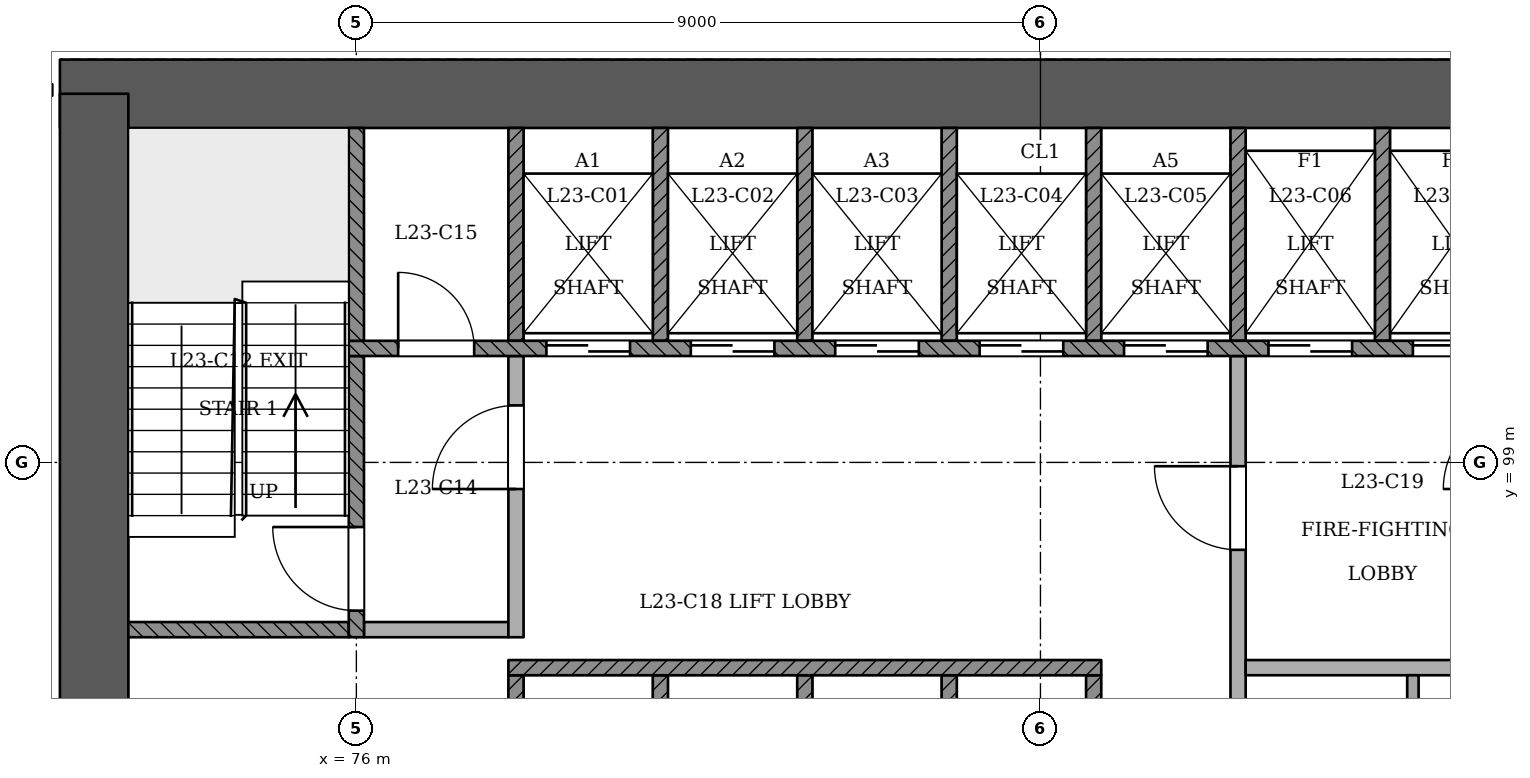
"""IFC4 building model, lengths in metres.
Left out: names, types, materials, properties, quantities, classifications, styles, units other than length and angle.
Written with IfcOpenShell. Run it as: python <this file> out.ifc"""

import sys

from ifc_helpers import new_model, si_unit, direction, frame, frame_2d, origin, place, context, subcontext, project, spatial, rectangle, extrude, element, fill, save


model = new_model("IFC4")
c1 = context("Model", 3, precision=1e-05, world=origin(), true_north=direction((0.0, 1.0)))
c2 = subcontext(c1, "Body", "Model", "MODEL_VIEW")
j1 = project(units=[si_unit("LENGTHUNIT", "METRE"), si_unit("PLANEANGLEUNIT", "RADIAN")], contexts=[c1])
p1 = place(None, origin())
s1 = spatial("IfcSite", under=j1, at=p1, CompositionType="ELEMENT")
p2 = place(p1, origin())
s2 = spatial("IfcBuilding", under=s1, at=p2, CompositionType="ELEMENT")
p3 = place(p2, frame((0.0, 0.0, 91.8)))
s3 = spatial("IfcBuildingStorey", under=s2, at=p3, CompositionType="ELEMENT", Elevation=91.8)
p4 = place(p3, frame((97.45, 103.85, 0.0), z_axis=(0.0, 0.0, 1.0), x_axis=(-1.0, 0.0, 0.0)))
e1 = element("IfcWall", 1, at=p4, inside=s3, PredefinedType="SHEAR", context=c2, shape_type="SweptSolid", body=[
    extrude(rectangle(XDim=25.35, YDim=0.9, at=frame_2d((12.675, 0.0))), origin(), (0.0, 0.0, 1.0), 3.6),
])
p5 = place(p3, frame((72.55, 103.85, 0.0), z_axis=(0.0, 0.0, 1.0), x_axis=(0.0, -1.0, 0.0)))
e2 = element("IfcWall", 2, at=p5, inside=s3, PredefinedType="SHEAR", context=c2, shape_type="SweptSolid", body=[
    extrude(rectangle(XDim=11.35, YDim=0.9, at=frame_2d((5.675, 0.0))), origin(), (0.0, 0.0, 1.0), 3.6),
])
p6 = place(p3, frame((63.319, 97.54, 0.0), z_axis=(0.0, 0.0, 1.0), x_axis=(0.500001382442, -0.86602460563, 0.0)))
e3 = element("IfcWall", 3, at=p6, inside=s3, PredefinedType="PARTITIONING", context=c2, shape_type="SweptSolid", body=[
    extrude(rectangle(XDim=42.252, YDim=0.15, at=frame_2d((21.126, 0.0))), origin(), (0.0, 0.0, 1.0), 2.9),
])
p7 = place(p6, frame((3.076, 0.0, 0.0)))
e4 = element("IfcOpeningElement", 4, at=p7, cuts=e3, PredefinedType="OPENING", context=c2, shape_type="SweptSolid", body=[
    extrude(rectangle(XDim=1.2, YDim=2.1, at=frame_2d((0.6, 1.05))), frame((0.0, 0.085, 0.0), z_axis=(0.0, -1.0, 0.0), x_axis=(1.0, 0.0, 0.0)), (0.0, 0.0, 1.0), 0.171),
])
p8 = place(p6, frame((10.455, 0.0, 0.0)))
e5 = element("IfcOpeningElement", 5, at=p8, cuts=e3, PredefinedType="OPENING", context=c2, shape_type="SweptSolid", body=[
    extrude(rectangle(XDim=1.1, YDim=2.1, at=frame_2d((0.55, 1.05))), frame((0.0, 0.085, 0.0), z_axis=(0.0, -1.0, 0.0), x_axis=(1.0, 0.0, 0.0)), (0.0, 0.0, 1.0), 0.171),
])
p9 = place(p6, frame((13.876, 0.0, 0.0)))
e6 = element("IfcOpeningElement", 6, at=p9, cuts=e3, PredefinedType="OPENING", context=c2, shape_type="SweptSolid", body=[
    extrude(rectangle(XDim=1.0, YDim=2.1, at=frame_2d((0.5, 1.05))), frame((0.0, 0.085, 0.0), z_axis=(0.0, -1.0, 0.0), x_axis=(1.0, 0.0, 0.0)), (0.0, 0.0, 1.0), 0.171),
])
p10 = place(p6, frame((18.376, 0.0, 0.0)))
e7 = element("IfcOpeningElement", 7, at=p10, cuts=e3, PredefinedType="OPENING", context=c2, shape_type="SweptSolid", body=[
    extrude(rectangle(XDim=1.0, YDim=2.1, at=frame_2d((0.5, 1.05))), frame((0.0, 0.085, 0.0), z_axis=(0.0, -1.0, 0.0), x_axis=(1.0, 0.0, 0.0)), (0.0, 0.0, 1.0), 0.171),
])
p11 = place(p6, frame((21.731, 0.0, 0.0)))
e8 = element("IfcOpeningElement", 8, at=p11, cuts=e3, PredefinedType="OPENING", context=c2, shape_type="SweptSolid", body=[
    extrude(rectangle(XDim=1.0, YDim=2.1, at=frame_2d((0.5, 1.05))), frame((0.0, 0.085, 0.0), z_axis=(0.0, -1.0, 0.0), x_axis=(1.0, 0.0, 0.0)), (0.0, 0.0, 1.0), 0.171),
])
p12 = place(p6, frame((28.406, 0.0, 0.0)))
e9 = element("IfcOpeningElement", 9, at=p12, cuts=e3, PredefinedType="OPENING", context=c2, shape_type="SweptSolid", body=[
    extrude(rectangle(XDim=1.0, YDim=2.1, at=frame_2d((0.5, 1.05))), frame((0.0, 0.085, 0.0), z_axis=(0.0, -1.0, 0.0), x_axis=(1.0, 0.0, 0.0)), (0.0, 0.0, 1.0), 0.171),
])
p13 = place(p6, frame((30.847, 0.0, 0.0)))
e10 = element("IfcOpeningElement", 10, at=p13, cuts=e3, PredefinedType="OPENING", context=c2, shape_type="SweptSolid", body=[
    extrude(rectangle(XDim=1.0, YDim=2.1, at=frame_2d((0.5, 1.05))), frame((0.0, 0.085, 0.0), z_axis=(0.0, -1.0, 0.0), x_axis=(1.0, 0.0, 0.0)), (0.0, 0.0, 1.0), 0.171),
])
p14 = place(p6, frame((37.989, 0.0, 0.0)))
e11 = element("IfcOpeningElement", 11, at=p14, cuts=e3, PredefinedType="OPENING", context=c2, shape_type="SweptSolid", body=[
    extrude(rectangle(XDim=1.2, YDim=2.1, at=frame_2d((0.6, 1.05))), frame((0.0, 0.085, 0.0), z_axis=(0.0, -1.0, 0.0), x_axis=(1.0, 0.0, 0.0)), (0.0, 0.0, 1.0), 0.171),
])
p15 = place(p3, frame((85.554, 60.948, 0.0), z_axis=(0.0, 0.0, 1.0), x_axis=(0.500001382442, 0.86602460563, 0.0)))
e12 = element("IfcWall", 12, at=p15, inside=s3, PredefinedType="PARTITIONING", context=c2, shape_type="SweptSolid", body=[
    extrude(rectangle(XDim=42.252, YDim=0.15, at=frame_2d((21.126, 0.0))), origin(), (0.0, 0.0, 1.0), 2.9),
])
p16 = place(p15, frame((0.285, 0.0, 0.0)))
e13 = element("IfcOpeningElement", 13, at=p16, cuts=e12, PredefinedType="OPENING", context=c2, shape_type="SweptSolid", body=[
    extrude(rectangle(XDim=1.2, YDim=2.1, at=frame_2d((0.6, 1.05))), frame((0.0, 0.085, 0.0), z_axis=(0.0, -1.0, 0.0), x_axis=(1.0, 0.0, 0.0)), (0.0, 0.0, 1.0), 0.171),
])
p17 = place(p15, frame((3.731, 0.0, 0.0)))
e14 = element("IfcOpeningElement", 14, at=p17, cuts=e12, PredefinedType="OPENING", context=c2, shape_type="SweptSolid", body=[
    extrude(rectangle(XDim=1.0, YDim=2.1, at=frame_2d((0.5, 1.05))), frame((0.0, 0.085, 0.0), z_axis=(0.0, -1.0, 0.0), x_axis=(1.0, 0.0, 0.0)), (0.0, 0.0, 1.0), 0.171),
])
p18 = place(p15, frame((11.526, 0.0, 0.0)))
e15 = element("IfcOpeningElement", 15, at=p18, cuts=e12, PredefinedType="OPENING", context=c2, shape_type="SweptSolid", body=[
    extrude(rectangle(XDim=1.2, YDim=2.1, at=frame_2d((0.6, 1.05))), frame((0.0, 0.085, 0.0), z_axis=(0.0, -1.0, 0.0), x_axis=(1.0, 0.0, 0.0)), (0.0, 0.0, 1.0), 0.171),
])
p19 = place(p15, frame((18.376, 0.0, 0.0)))
e16 = element("IfcOpeningElement", 16, at=p19, cuts=e12, PredefinedType="OPENING", context=c2, shape_type="SweptSolid", body=[
    extrude(rectangle(XDim=1.0, YDim=2.1, at=frame_2d((0.5, 1.05))), frame((0.0, 0.085, 0.0), z_axis=(0.0, -1.0, 0.0), x_axis=(1.0, 0.0, 0.0)), (0.0, 0.0, 1.0), 0.171),
])
p20 = place(p15, frame((21.731, 0.0, 0.0)))
e17 = element("IfcOpeningElement", 17, at=p20, cuts=e12, PredefinedType="OPENING", context=c2, shape_type="SweptSolid", body=[
    extrude(rectangle(XDim=1.0, YDim=2.1, at=frame_2d((0.5, 1.05))), frame((0.0, 0.085, 0.0), z_axis=(0.0, -1.0, 0.0), x_axis=(1.0, 0.0, 0.0)), (0.0, 0.0, 1.0), 0.171),
])
p21 = place(p15, frame((27.376, 0.0, 0.0)))
e18 = element("IfcOpeningElement", 18, at=p21, cuts=e12, PredefinedType="OPENING", context=c2, shape_type="SweptSolid", body=[
    extrude(rectangle(XDim=1.0, YDim=2.1, at=frame_2d((0.5, 1.05))), frame((0.0, 0.085, 0.0), z_axis=(0.0, -1.0, 0.0), x_axis=(1.0, 0.0, 0.0)), (0.0, 0.0, 1.0), 0.171),
])
p22 = place(p15, frame((30.697, 0.0, 0.0)))
e19 = element("IfcOpeningElement", 19, at=p22, cuts=e12, PredefinedType="OPENING", context=c2, shape_type="SweptSolid", body=[
    extrude(rectangle(XDim=1.1, YDim=2.1, at=frame_2d((0.55, 1.05))), frame((0.0, 0.085, 0.0), z_axis=(0.0, -1.0, 0.0), x_axis=(1.0, 0.0, 0.0)), (0.0, 0.0, 1.0), 0.171),
])
p23 = place(p15, frame((37.976, 0.0, 0.0)))
e20 = element("IfcOpeningElement", 20, at=p23, cuts=e12, PredefinedType="OPENING", context=c2, shape_type="SweptSolid", body=[
    extrude(rectangle(XDim=1.2, YDim=2.1, at=frame_2d((0.6, 1.05))), frame((0.0, 0.085, 0.0), z_axis=(0.0, -1.0, 0.0), x_axis=(1.0, 0.0, 0.0)), (0.0, 0.0, 1.0), 0.171),
])
p24 = place(p3, frame((72.0, 103.9, 0.0), z_axis=(0.0, 0.0, 1.0), x_axis=(-1.0, 0.0, 0.0)))
e21 = element("IfcWall", 21, at=p24, inside=s3, PredefinedType="PARTITIONING", context=c2, shape_type="SweptSolid", body=[
    extrude(rectangle(XDim=1.925, YDim=0.15, at=frame_2d((0.962, 0.0))), origin(), (0.0, 0.0, 1.0), 3.3),
])
for number, where, z_axis, x_axis in (
    (22, (78.1, 93.4, 0.0), (0.0, 0.0, 1.0), (0.0, 1.0, 0.0)),
    (23, (80.0, 93.4, 0.0), (0.0, 0.0, 1.0), (0.0, 1.0, 0.0)),
    (24, (81.9, 93.4, 0.0), (0.0, 0.0, 1.0), (0.0, 1.0, 0.0)),
    (25, (83.8, 93.4, 0.0), (0.0, 0.0, 1.0), (0.0, 1.0, 0.0)),
    (26, (85.7, 93.4, 0.0), (0.0, 0.0, 1.0), (0.0, 1.0, 0.0)),
):
    element("IfcWall", number, at=place(p3, frame(where, z_axis=z_axis, x_axis=x_axis)), inside=s3, PredefinedType="SOLIDWALL", context=c2, shape_type="SweptSolid", body=[
        extrude(rectangle(XDim=2.8, YDim=0.2, at=frame_2d((1.4, 0.0))), origin(), (0.0, 0.0, 1.0), 3.3),
    ])
p25 = place(p3, frame((87.6, 93.4, 0.0), z_axis=(0.0, 0.0, 1.0), x_axis=(0.0, 1.0, 0.0)))
e27 = element("IfcWall", 27, at=p25, inside=s3, PredefinedType="PARTITIONING", context=c2, shape_type="SweptSolid", body=[
    extrude(rectangle(XDim=7.0, YDim=0.2, at=frame_2d((3.5, 0.0))), origin(), (0.0, 0.0, 1.0), 3.3),
])
p26 = place(p25, frame((4.45, 0.0, 0.0)))
e28 = element("IfcOpeningElement", 28, at=p26, cuts=e27, PredefinedType="OPENING", context=c2, shape_type="SweptSolid", body=[
    extrude(rectangle(XDim=1.1, YDim=2.1, at=frame_2d((0.55, 1.05))), frame((0.0, 0.11, 0.0), z_axis=(0.0, -1.0, 0.0), x_axis=(1.0, 0.0, 0.0)), (0.0, 0.0, 1.0), 0.221),
])
p27 = place(p3, frame((89.9, 93.4, 0.0), z_axis=(0.0, 0.0, 1.0), x_axis=(0.0, 1.0, 0.0)))
e29 = element("IfcWall", 29, at=p27, inside=s3, PredefinedType="PARTITIONING", context=c2, shape_type="SweptSolid", body=[
    extrude(rectangle(XDim=2.8, YDim=0.15, at=frame_2d((1.4, 0.0))), origin(), (0.0, 0.0, 1.0), 3.3),
])
p28 = place(p3, frame((78.0, 96.3, 0.0), z_axis=(0.0, 0.0, 1.0), x_axis=(1.0, 0.0, 0.0)))
e30 = element("IfcWall", 30, at=p28, inside=s3, PredefinedType="SOLIDWALL", context=c2, shape_type="SweptSolid", body=[
    extrude(rectangle(XDim=7.8, YDim=0.2, at=frame_2d((3.9, 0.0))), origin(), (0.0, 0.0, 1.0), 3.3),
])
p29 = place(p3, frame((87.7, 96.3, 0.0), z_axis=(0.0, 0.0, 1.0), x_axis=(1.0, 0.0, 0.0)))
e31 = element("IfcWall", 31, at=p29, inside=s3, PredefinedType="PARTITIONING", context=c2, shape_type="SweptSolid", body=[
    extrude(rectangle(XDim=3.6, YDim=0.2, at=frame_2d((1.8, 0.0))), origin(), (0.0, 0.0, 1.0), 3.3),
])
p30 = place(p3, frame((73.0, 96.8, 0.0), z_axis=(0.0, 0.0, 1.0), x_axis=(1.0, 0.0, 0.0)))
e32 = element("IfcWall", 32, at=p30, inside=s3, PredefinedType="SOLIDWALL", context=c2, shape_type="SweptSolid", body=[
    extrude(rectangle(XDim=2.9, YDim=0.2, at=frame_2d((1.45, 0.0))), origin(), (0.0, 0.0, 1.0), 3.3),
])
p31 = place(p3, frame((76.0, 96.7, 0.0), z_axis=(0.0, 0.0, 1.0), x_axis=(0.0, 1.0, 0.0)))
e33 = element("IfcWall", 33, at=p31, inside=s3, PredefinedType="SOLIDWALL", context=c2, shape_type="SweptSolid", body=[
    extrude(rectangle(XDim=3.7, YDim=0.2, at=frame_2d((1.85, 0.0))), origin(), (0.0, 0.0, 1.0), 3.3),
])
p32 = place(p31, frame((0.35, 0.0, 0.0)))
e34 = element("IfcOpeningElement", 34, at=p32, cuts=e33, PredefinedType="OPENING", context=c2, shape_type="SweptSolid", body=[
    extrude(rectangle(XDim=1.1, YDim=2.1, at=frame_2d((0.55, 1.05))), frame((0.0, 0.11, 0.0), z_axis=(0.0, -1.0, 0.0), x_axis=(1.0, 0.0, 0.0)), (0.0, 0.0, 1.0), 0.221),
])
p33 = place(p3, frame((76.1, 96.8, 0.0), z_axis=(0.0, 0.0, 1.0), x_axis=(1.0, 0.0, 0.0)))
e35 = element("IfcWall", 35, at=p33, inside=s3, PredefinedType="PARTITIONING", context=c2, shape_type="SweptSolid", body=[
    extrude(rectangle(XDim=1.9, YDim=0.2, at=frame_2d((0.95, 0.0))), origin(), (0.0, 0.0, 1.0), 3.3),
])
p34 = place(p3, frame((78.1, 96.7, 0.0), z_axis=(0.0, 0.0, 1.0), x_axis=(0.0, 1.0, 0.0)))
e36 = element("IfcWall", 36, at=p34, inside=s3, PredefinedType="PARTITIONING", context=c2, shape_type="SweptSolid", body=[
    extrude(rectangle(XDim=3.7, YDim=0.2, at=frame_2d((1.85, 0.0))), origin(), (0.0, 0.0, 1.0), 3.3),
])
p35 = place(p34, frame((1.95, 0.0, 0.0)))
e37 = element("IfcOpeningElement", 37, at=p35, cuts=e36, PredefinedType="OPENING", context=c2, shape_type="SweptSolid", body=[
    extrude(rectangle(XDim=1.1, YDim=2.1, at=frame_2d((0.55, 1.05))), frame((0.0, 0.11, 0.0), z_axis=(0.0, -1.0, 0.0), x_axis=(1.0, 0.0, 0.0)), (0.0, 0.0, 1.0), 0.221),
])
p36 = place(p3, frame((75.9, 100.5, 0.0), z_axis=(0.0, 0.0, 1.0), x_axis=(1.0, 0.0, 0.0)))
e38 = element("IfcWall", 38, at=p36, inside=s3, PredefinedType="SOLIDWALL", context=c2, shape_type="SweptSolid", body=[
    extrude(rectangle(XDim=18.2, YDim=0.2, at=frame_2d((9.1, 0.0))), origin(), (0.0, 0.0, 1.0), 3.3),
])
p37 = place(p36, frame((2.6, 0.0, 0.0)))
e39 = element("IfcOpeningElement", 39, at=p37, cuts=e38, PredefinedType="OPENING", context=c2, shape_type="SweptSolid", body=[
    extrude(rectangle(XDim=1.1, YDim=2.1, at=frame_2d((0.55, 1.05))), frame((0.0, 0.11, 0.0), z_axis=(0.0, -1.0, 0.0), x_axis=(1.0, 0.0, 0.0)), (0.0, 0.0, 1.0), 0.221),
])
p38 = place(p36, frame((4.5, 0.0, 0.0)))
e40 = element("IfcOpeningElement", 40, at=p38, cuts=e38, PredefinedType="OPENING", context=c2, shape_type="SweptSolid", body=[
    extrude(rectangle(XDim=1.1, YDim=2.1, at=frame_2d((0.55, 1.05))), frame((0.0, 0.11, 0.0), z_axis=(0.0, -1.0, 0.0), x_axis=(1.0, 0.0, 0.0)), (0.0, 0.0, 1.0), 0.221),
])
p39 = place(p36, frame((6.4, 0.0, 0.0)))
e41 = element("IfcOpeningElement", 41, at=p39, cuts=e38, PredefinedType="OPENING", context=c2, shape_type="SweptSolid", body=[
    extrude(rectangle(XDim=1.1, YDim=2.1, at=frame_2d((0.55, 1.05))), frame((0.0, 0.11, 0.0), z_axis=(0.0, -1.0, 0.0), x_axis=(1.0, 0.0, 0.0)), (0.0, 0.0, 1.0), 0.221),
])
p40 = place(p36, frame((8.3, 0.0, 0.0)))
e42 = element("IfcOpeningElement", 42, at=p40, cuts=e38, PredefinedType="OPENING", context=c2, shape_type="SweptSolid", body=[
    extrude(rectangle(XDim=1.1, YDim=2.1, at=frame_2d((0.55, 1.05))), frame((0.0, 0.11, 0.0), z_axis=(0.0, -1.0, 0.0), x_axis=(1.0, 0.0, 0.0)), (0.0, 0.0, 1.0), 0.221),
])
p41 = place(p36, frame((10.2, 0.0, 0.0)))
e43 = element("IfcOpeningElement", 43, at=p41, cuts=e38, PredefinedType="OPENING", context=c2, shape_type="SweptSolid", body=[
    extrude(rectangle(XDim=1.1, YDim=2.1, at=frame_2d((0.55, 1.05))), frame((0.0, 0.11, 0.0), z_axis=(0.0, -1.0, 0.0), x_axis=(1.0, 0.0, 0.0)), (0.0, 0.0, 1.0), 0.221),
])
p42 = place(p36, frame((12.1, 0.0, 0.0)))
e44 = element("IfcOpeningElement", 44, at=p42, cuts=e38, PredefinedType="OPENING", context=c2, shape_type="SweptSolid", body=[
    extrude(rectangle(XDim=1.1, YDim=2.1, at=frame_2d((0.55, 1.05))), frame((0.0, 0.11, 0.0), z_axis=(0.0, -1.0, 0.0), x_axis=(1.0, 0.0, 0.0)), (0.0, 0.0, 1.0), 0.221),
])
p43 = place(p36, frame((14.0, 0.0, 0.0)))
e45 = element("IfcOpeningElement", 45, at=p43, cuts=e38, PredefinedType="OPENING", context=c2, shape_type="SweptSolid", body=[
    extrude(rectangle(XDim=1.1, YDim=2.1, at=frame_2d((0.55, 1.05))), frame((0.0, 0.11, 0.0), z_axis=(0.0, -1.0, 0.0), x_axis=(1.0, 0.0, 0.0)), (0.0, 0.0, 1.0), 0.221),
])
p44 = place(p36, frame((0.65, 0.0, 0.0)))
e46 = element("IfcOpeningElement", 46, at=p44, cuts=e38, PredefinedType="OPENING", context=c2, shape_type="SweptSolid", body=[
    extrude(rectangle(XDim=1.0, YDim=2.1, at=frame_2d((0.5, 1.05))), frame((0.0, 0.11, 0.0), z_axis=(0.0, -1.0, 0.0), x_axis=(1.0, 0.0, 0.0)), (0.0, 0.0, 1.0), 0.221),
])
p45 = place(p36, frame((16.3, 0.0, 0.0)))
e47 = element("IfcOpeningElement", 47, at=p45, cuts=e38, PredefinedType="OPENING", context=c2, shape_type="SweptSolid", body=[
    extrude(rectangle(XDim=1.0, YDim=2.1, at=frame_2d((0.5, 1.05))), frame((0.0, 0.11, 0.0), z_axis=(0.0, -1.0, 0.0), x_axis=(1.0, 0.0, 0.0)), (0.0, 0.0, 1.0), 0.221),
])
for number, where, z_axis, x_axis in (
    (48, (76.0, 100.6, 0.0), (0.0, 0.0, 1.0), (0.0, 1.0, 0.0)),
    (49, (78.1, 100.6, 0.0), (0.0, 0.0, 1.0), (0.0, 1.0, 0.0)),
    (50, (80.0, 100.6, 0.0), (0.0, 0.0, 1.0), (0.0, 1.0, 0.0)),
    (51, (81.9, 100.6, 0.0), (0.0, 0.0, 1.0), (0.0, 1.0, 0.0)),
    (52, (83.8, 100.6, 0.0), (0.0, 0.0, 1.0), (0.0, 1.0, 0.0)),
    (53, (85.7, 100.6, 0.0), (0.0, 0.0, 1.0), (0.0, 1.0, 0.0)),
    (54, (87.6, 100.6, 0.0), (0.0, 0.0, 1.0), (0.0, 1.0, 0.0)),
    (55, (89.5, 100.6, 0.0), (0.0, 0.0, 1.0), (0.0, 1.0, 0.0)),
):
    element("IfcWall", number, at=place(p3, frame(where, z_axis=z_axis, x_axis=x_axis)), inside=s3, PredefinedType="SOLIDWALL", context=c2, shape_type="SweptSolid", body=[
        extrude(rectangle(XDim=2.8, YDim=0.2, at=frame_2d((1.4, 0.0))), origin(), (0.0, 0.0, 1.0), 3.3),
    ])
p46 = place(p37, origin())
e56 = element("IfcDoor", 56, at=p46, inside=s3, OperationType="SLIDING_TO_RIGHT", PredefinedType="NOTDEFINED", context=c2, shape_type="SweptSolid", body=[
    extrude(rectangle(XDim=1.1, YDim=2.1, at=frame_2d((0.55, 1.05))), frame((0.0, 0.025, 0.0), z_axis=(0.0, -1.0, 0.0), x_axis=(1.0, 0.0, 0.0)), (0.0, 0.0, 1.0), 0.05),
])
fill(e39, e56)
p47 = place(p38, origin())
e57 = element("IfcDoor", 57, at=p47, inside=s3, OperationType="SLIDING_TO_LEFT", PredefinedType="NOTDEFINED", context=c2, shape_type="SweptSolid", body=[
    extrude(rectangle(XDim=1.1, YDim=2.1, at=frame_2d((0.55, 1.05))), frame((0.0, 0.025, 0.0), z_axis=(0.0, -1.0, 0.0), x_axis=(1.0, 0.0, 0.0)), (0.0, 0.0, 1.0), 0.05),
])
fill(e40, e57)
p48 = place(p39, origin())
e58 = element("IfcDoor", 58, at=p48, inside=s3, OperationType="SLIDING_TO_RIGHT", PredefinedType="NOTDEFINED", context=c2, shape_type="SweptSolid", body=[
    extrude(rectangle(XDim=1.1, YDim=2.1, at=frame_2d((0.55, 1.05))), frame((0.0, 0.025, 0.0), z_axis=(0.0, -1.0, 0.0), x_axis=(1.0, 0.0, 0.0)), (0.0, 0.0, 1.0), 0.05),
])
fill(e41, e58)
p49 = place(p40, origin())
e59 = element("IfcDoor", 59, at=p49, inside=s3, OperationType="SLIDING_TO_LEFT", PredefinedType="NOTDEFINED", context=c2, shape_type="SweptSolid", body=[
    extrude(rectangle(XDim=1.1, YDim=2.1, at=frame_2d((0.55, 1.05))), frame((0.0, 0.025, 0.0), z_axis=(0.0, -1.0, 0.0), x_axis=(1.0, 0.0, 0.0)), (0.0, 0.0, 1.0), 0.05),
])
fill(e42, e59)
p50 = place(p41, origin())
e60 = element("IfcDoor", 60, at=p50, inside=s3, OperationType="SLIDING_TO_RIGHT", PredefinedType="NOTDEFINED", context=c2, shape_type="SweptSolid", body=[
    extrude(rectangle(XDim=1.1, YDim=2.1, at=frame_2d((0.55, 1.05))), frame((0.0, 0.025, 0.0), z_axis=(0.0, -1.0, 0.0), x_axis=(1.0, 0.0, 0.0)), (0.0, 0.0, 1.0), 0.05),
])
fill(e43, e60)
p51 = place(p42, origin())
e61 = element("IfcDoor", 61, at=p51, inside=s3, OperationType="SLIDING_TO_RIGHT", PredefinedType="NOTDEFINED", context=c2, shape_type="SweptSolid", body=[
    extrude(rectangle(XDim=1.1, YDim=2.1, at=frame_2d((0.55, 1.05))), frame((0.0, 0.025, 0.0), z_axis=(0.0, -1.0, 0.0), x_axis=(1.0, 0.0, 0.0)), (0.0, 0.0, 1.0), 0.05),
])
fill(e44, e61)
p52 = place(p43, origin())
e62 = element("IfcDoor", 62, at=p52, inside=s3, OperationType="SLIDING_TO_LEFT", PredefinedType="NOTDEFINED", context=c2, shape_type="SweptSolid", body=[
    extrude(rectangle(XDim=1.1, YDim=2.1, at=frame_2d((0.55, 1.05))), frame((0.0, 0.025, 0.0), z_axis=(0.0, -1.0, 0.0), x_axis=(1.0, 0.0, 0.0)), (0.0, 0.0, 1.0), 0.05),
])
fill(e45, e62)
p53 = place(p32, origin())
e63 = element("IfcDoor", 63, at=p53, inside=s3, OperationType="SINGLE_SWING_RIGHT", PredefinedType="NOTDEFINED", context=c2, shape_type="SweptSolid", body=[
    extrude(rectangle(XDim=1.1, YDim=2.1, at=frame_2d((0.55, 1.05))), frame((0.0, 0.025, 0.0), z_axis=(0.0, -1.0, 0.0), x_axis=(1.0, 0.0, 0.0)), (0.0, 0.0, 1.0), 0.05),
])
fill(e34, e63)
p54 = place(p35, origin())
e64 = element("IfcDoor", 64, at=p54, inside=s3, OperationType="SINGLE_SWING_LEFT", PredefinedType="NOTDEFINED", context=c2, shape_type="SweptSolid", body=[
    extrude(rectangle(XDim=1.1, YDim=2.1, at=frame_2d((0.55, 1.05))), frame((0.0, 0.025, 0.0), z_axis=(0.0, -1.0, 0.0), x_axis=(1.0, 0.0, 0.0)), (0.0, 0.0, 1.0), 0.05),
])
fill(e37, e64)
p55 = place(p26, origin())
e65 = element("IfcDoor", 65, at=p55, inside=s3, OperationType="SINGLE_SWING_RIGHT", PredefinedType="NOTDEFINED", context=c2, shape_type="SweptSolid", body=[
    extrude(rectangle(XDim=1.1, YDim=2.1, at=frame_2d((0.55, 1.05))), frame((0.0, 0.025, 0.0), z_axis=(0.0, -1.0, 0.0), x_axis=(1.0, 0.0, 0.0)), (0.0, 0.0, 1.0), 0.05),
])
fill(e28, e65)
p56 = place(p44, origin())
e66 = element("IfcDoor", 66, at=p56, inside=s3, OperationType="SINGLE_SWING_LEFT", PredefinedType="NOTDEFINED", context=c2, shape_type="SweptSolid", body=[
    extrude(rectangle(XDim=1.0, YDim=2.1, at=frame_2d((0.5, 1.05))), frame((0.0, 0.025, 0.0), z_axis=(0.0, -1.0, 0.0), x_axis=(1.0, 0.0, 0.0)), (0.0, 0.0, 1.0), 0.05),
])
fill(e46, e66)
save(model, sys.argv[1])
